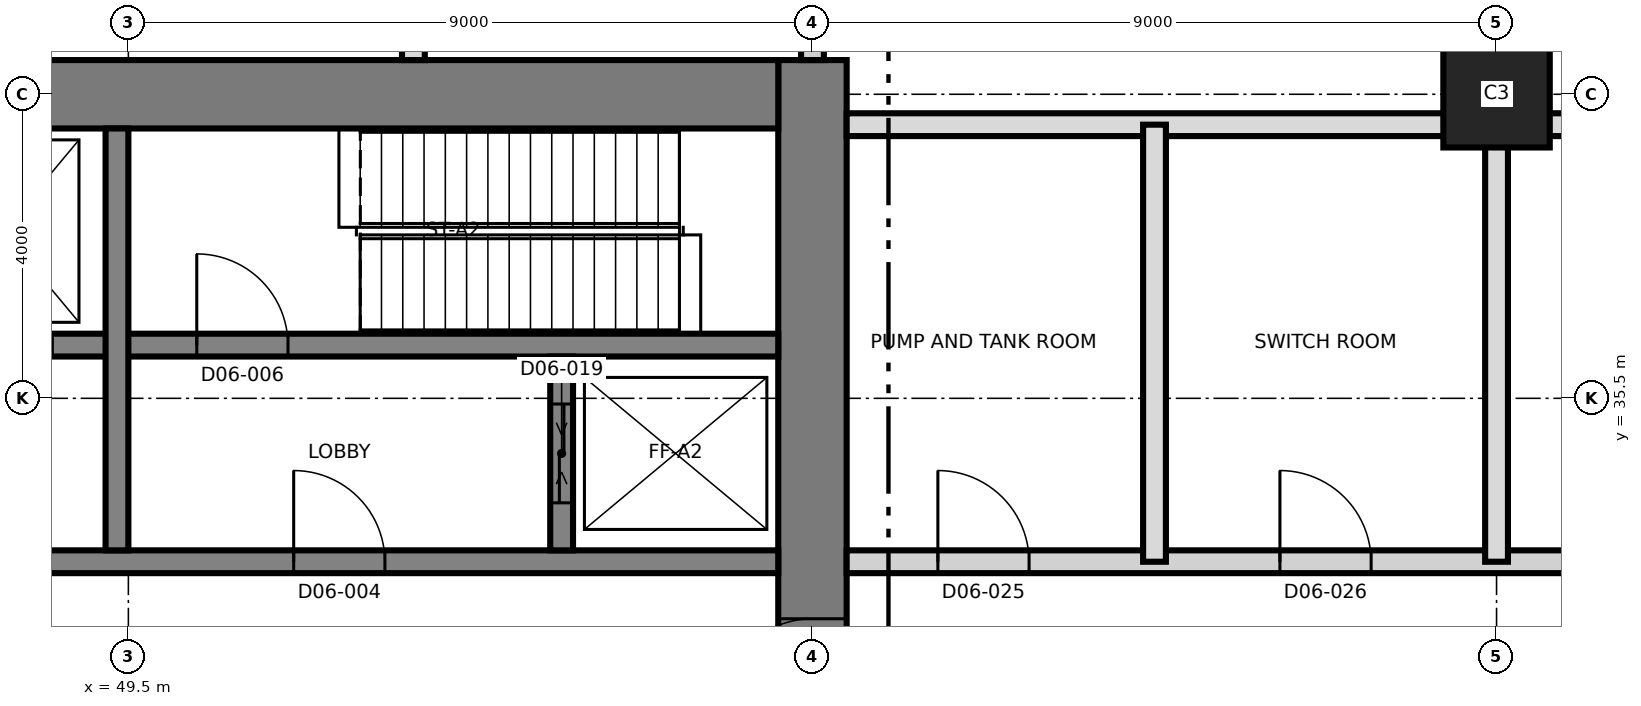
"""IFC4 building model, lengths in metres.
Left out: names, types, materials, properties, quantities, classifications, styles, units other than length and angle.
Written with IfcOpenShell. Run it as: python <this file> out.ifc"""

import sys

from ifc_helpers import new_model, si_unit, direction, frame, frame_2d, origin, origin_2d, place, context, subcontext, project, spatial, rectangle, extrude, element, fill, save


model = new_model("IFC4")
c1 = context("Model", 3, precision=1e-05, world=origin(), true_north=direction((0.0, 1.0)))
c2 = subcontext(c1, "Body", "Model", "MODEL_VIEW")
j1 = project(units=[si_unit("LENGTHUNIT", "METRE"), si_unit("PLANEANGLEUNIT", "RADIAN")], contexts=[c1])
p1 = place(None, origin())
s1 = spatial("IfcSite", under=j1, at=p1, CompositionType="ELEMENT")
p2 = place(p1, origin())
s2 = spatial("IfcBuilding", under=s1, at=p2, CompositionType="ELEMENT")
p3 = place(p2, frame((0.0, 0.0, 81.6)))
s3 = spatial("IfcBuildingStorey", under=s2, at=p3, CompositionType="ELEMENT", Elevation=81.6)
p4 = place(p3, frame((58.5, 21.05, 0.0), z_axis=(0.0, 0.0, 1.0), x_axis=(0.0, 1.0, 0.0)))
e1 = element("IfcWall", 1, at=p4, inside=s3, PredefinedType="SHEAR", context=c2, shape_type="SweptSolid", body=[
    extrude(rectangle(XDim=18.9, YDim=0.9, at=frame_2d((9.45, 0.0))), origin(), (0.0, 0.0, 1.0), 5.5),
])
p5 = place(p4, frame((10.35, 0.0, 0.0)))
e2 = element("IfcOpeningElement", 2, at=p5, cuts=e1, PredefinedType="OPENING", context=c2, shape_type="SweptSolid", body=[
    extrude(rectangle(XDim=1.2, YDim=2.1, at=frame_2d((0.6, 1.05))), frame((0.0, 0.46, 0.0), z_axis=(0.0, -1.0, 0.0), x_axis=(1.0, 0.0, 0.0)), (0.0, 0.0, 1.0), 0.92),
])
p6 = place(p3, frame((31.05, 39.5, 0.0), z_axis=(0.0, 0.0, 1.0), x_axis=(1.0, 0.0, 0.0)))
e3 = element("IfcWall", 3, at=p6, inside=s3, PredefinedType="SHEAR", context=c2, shape_type="SweptSolid", body=[
    extrude(rectangle(XDim=27.0, YDim=0.9, at=frame_2d((13.5, 0.0))), origin(), (0.0, 0.0, 1.0), 5.5),
])
p7 = place(p6, frame((10.65, 0.0, 0.0)))
e4 = element("IfcOpeningElement", 4, at=p7, cuts=e3, PredefinedType="OPENING", context=c2, shape_type="SweptSolid", body=[
    extrude(rectangle(XDim=1.2, YDim=2.1, at=frame_2d((0.6, 1.05))), frame((0.0, 0.46, 0.0), z_axis=(0.0, -1.0, 0.0), x_axis=(1.0, 0.0, 0.0)), (0.0, 0.0, 1.0), 0.92),
])
p8 = place(p3, frame((31.95, 33.35, 0.0), z_axis=(0.0, 0.0, 1.0), x_axis=(1.0, 0.0, 0.0)))
e5 = element("IfcWall", 5, at=p8, inside=s3, PredefinedType="SHEAR", context=c2, shape_type="SweptSolid", body=[
    extrude(rectangle(XDim=26.1, YDim=0.3, at=frame_2d((13.05, 0.0))), origin(), (0.0, 0.0, 1.0), 5.5),
])
p9 = place(p8, frame((13.7, 0.0, 0.0)))
e6 = element("IfcOpeningElement", 6, at=p9, cuts=e5, PredefinedType="OPENING", context=c2, shape_type="SweptSolid", body=[
    extrude(rectangle(XDim=1.4, YDim=2.1, at=frame_2d((0.7, 1.05))), frame((0.0, 0.16, 0.0), z_axis=(0.0, -1.0, 0.0), x_axis=(1.0, 0.0, 0.0)), (0.0, 0.0, 1.0), 0.32),
])
p10 = place(p8, frame((5.175, 0.0, 0.0)))
e7 = element("IfcOpeningElement", 7, at=p10, cuts=e5, PredefinedType="OPENING", context=c2, shape_type="SweptSolid", body=[
    extrude(rectangle(XDim=1.2, YDim=2.1, at=frame_2d((0.6, 1.05))), frame((0.0, 0.16, 0.0), z_axis=(0.0, -1.0, 0.0), x_axis=(1.0, 0.0, 0.0)), (0.0, 0.0, 1.0), 0.32),
])
p11 = place(p8, frame((19.725, 0.0, 0.0)))
e8 = element("IfcOpeningElement", 8, at=p11, cuts=e5, PredefinedType="OPENING", context=c2, shape_type="SweptSolid", body=[
    extrude(rectangle(XDim=1.2, YDim=2.1, at=frame_2d((0.6, 1.05))), frame((0.0, 0.16, 0.0), z_axis=(0.0, -1.0, 0.0), x_axis=(1.0, 0.0, 0.0)), (0.0, 0.0, 1.0), 0.32),
])
p12 = place(p3, frame((43.5, 36.2, 0.0), z_axis=(0.0, 0.0, 1.0), x_axis=(1.0, 0.0, 0.0)))
e9 = element("IfcWall", 9, at=p12, inside=s3, PredefinedType="SHEAR", context=c2, shape_type="SweptSolid", body=[
    extrude(rectangle(XDim=14.55, YDim=0.3, at=frame_2d((7.275, 0.0))), origin(), (0.0, 0.0, 1.0), 5.5),
])
p13 = place(p12, frame((6.9, 0.0, 0.0)))
e10 = element("IfcOpeningElement", 10, at=p13, cuts=e9, PredefinedType="OPENING", context=c2, shape_type="SweptSolid", body=[
    extrude(rectangle(XDim=1.2, YDim=2.1, at=frame_2d((0.6, 1.05))), frame((0.0, 0.16, 0.0), z_axis=(0.0, -1.0, 0.0), x_axis=(1.0, 0.0, 0.0)), (0.0, 0.0, 1.0), 0.32),
])
p14 = place(p12, frame((0.7, 0.0, 0.0)))
e11 = element("IfcOpeningElement", 11, at=p14, cuts=e9, PredefinedType="OPENING", context=c2, shape_type="SweptSolid", body=[
    extrude(rectangle(XDim=1.3, YDim=2.4, at=frame_2d((0.65, 1.2))), frame((0.0, 0.16, 0.0), z_axis=(0.0, -1.0, 0.0), x_axis=(1.0, 0.0, 0.0)), (0.0, 0.0, 1.0), 0.32),
])
p15 = place(p12, frame((3.7, 0.0, 0.0)))
e12 = element("IfcOpeningElement", 12, at=p15, cuts=e9, PredefinedType="OPENING", context=c2, shape_type="SweptSolid", body=[
    extrude(rectangle(XDim=1.3, YDim=2.4, at=frame_2d((0.65, 1.2))), frame((0.0, 0.16, 0.0), z_axis=(0.0, -1.0, 0.0), x_axis=(1.0, 0.0, 0.0)), (0.0, 0.0, 1.0), 0.32),
])
p16 = place(p3, frame((49.35, 33.5, 0.0), z_axis=(0.0, 0.0, 1.0), x_axis=(0.0, 1.0, 0.0)))
e13 = element("IfcWall", 13, at=p16, inside=s3, PredefinedType="SHEAR", context=c2, shape_type="SweptSolid", body=[
    extrude(rectangle(XDim=5.55, YDim=0.3, at=frame_2d((2.775, 0.0))), origin(), (0.0, 0.0, 1.0), 5.5),
])
p17 = place(p3, frame((55.2, 33.5, 0.0), z_axis=(0.0, 0.0, 1.0), x_axis=(0.0, 1.0, 0.0)))
e14 = element("IfcWall", 14, at=p17, inside=s3, PredefinedType="SHEAR", context=c2, shape_type="SweptSolid", body=[
    extrude(rectangle(XDim=2.55, YDim=0.3, at=frame_2d((1.275, 0.0))), origin(), (0.0, 0.0, 1.0), 5.5),
])
p18 = place(p17, frame((0.625, 0.0, 0.0)))
e15 = element("IfcOpeningElement", 15, at=p18, cuts=e14, PredefinedType="OPENING", context=c2, shape_type="SweptSolid", body=[
    extrude(rectangle(XDim=1.3, YDim=2.4, at=frame_2d((0.65, 1.2))), frame((0.0, 0.16, 0.0), z_axis=(0.0, -1.0, 0.0), x_axis=(1.0, 0.0, 0.0)), (0.0, 0.0, 1.0), 0.32),
])
p19 = place(p3, frame((67.5, 39.5, 0.0), z_axis=(0.0, 0.0, 1.0), x_axis=(1.0, 0.0, 0.0)))
e16 = element("IfcColumn", 16, at=p19, inside=s3, PredefinedType="COLUMN", context=c2, shape_type="SweptSolid", body=[
    extrude(rectangle(XDim=1.4, YDim=1.4, at=origin_2d()), origin(), (0.0, 0.0, 1.0), 5.5),
])
p20 = place(p3, frame((58.95, 33.35, 0.0), z_axis=(0.0, 0.0, 1.0), x_axis=(1.0, 0.0, 0.0)))
e17 = element("IfcWall", 17, at=p20, inside=s3, PredefinedType="PARTITIONING", context=c2, shape_type="SweptSolid", body=[
    extrude(rectangle(XDim=26.38, YDim=0.3, at=frame_2d((13.19, 0.0))), origin(), (0.0, 0.0, 1.0), 5.2),
])
p21 = place(p20, frame((1.2, 0.0, 0.0)))
e18 = element("IfcOpeningElement", 18, at=p21, cuts=e17, PredefinedType="OPENING", context=c2, shape_type="SweptSolid", body=[
    extrude(rectangle(XDim=1.2, YDim=2.1, at=frame_2d((0.6, 1.05))), frame((0.0, 0.16, 0.0), z_axis=(0.0, -1.0, 0.0), x_axis=(1.0, 0.0, 0.0)), (0.0, 0.0, 1.0), 0.32),
])
p22 = place(p20, frame((5.7, 0.0, 0.0)))
e19 = element("IfcOpeningElement", 19, at=p22, cuts=e17, PredefinedType="OPENING", context=c2, shape_type="SweptSolid", body=[
    extrude(rectangle(XDim=1.2, YDim=2.1, at=frame_2d((0.6, 1.05))), frame((0.0, 0.16, 0.0), z_axis=(0.0, -1.0, 0.0), x_axis=(1.0, 0.0, 0.0)), (0.0, 0.0, 1.0), 0.32),
])
p23 = place(p20, frame((10.2, 0.0, 0.0)))
e20 = element("IfcOpeningElement", 20, at=p23, cuts=e17, PredefinedType="OPENING", context=c2, shape_type="SweptSolid", body=[
    extrude(rectangle(XDim=1.2, YDim=2.1, at=frame_2d((0.6, 1.05))), frame((0.0, 0.16, 0.0), z_axis=(0.0, -1.0, 0.0), x_axis=(1.0, 0.0, 0.0)), (0.0, 0.0, 1.0), 0.32),
])
p24 = place(p20, frame((14.7, 0.0, 0.0)))
e21 = element("IfcOpeningElement", 21, at=p24, cuts=e17, PredefinedType="OPENING", context=c2, shape_type="SweptSolid", body=[
    extrude(rectangle(XDim=1.2, YDim=2.1, at=frame_2d((0.6, 1.05))), frame((0.0, 0.16, 0.0), z_axis=(0.0, -1.0, 0.0), x_axis=(1.0, 0.0, 0.0)), (0.0, 0.0, 1.0), 0.32),
])
p25 = place(p20, frame((19.2, 0.0, 0.0)))
e22 = element("IfcOpeningElement", 22, at=p25, cuts=e17, PredefinedType="OPENING", context=c2, shape_type="SweptSolid", body=[
    extrude(rectangle(XDim=1.2, YDim=2.1, at=frame_2d((0.6, 1.05))), frame((0.0, 0.16, 0.0), z_axis=(0.0, -1.0, 0.0), x_axis=(1.0, 0.0, 0.0)), (0.0, 0.0, 1.0), 0.32),
])
p26 = place(p20, frame((23.7, 0.0, 0.0)))
e23 = element("IfcOpeningElement", 23, at=p26, cuts=e17, PredefinedType="OPENING", context=c2, shape_type="SweptSolid", body=[
    extrude(rectangle(XDim=1.2, YDim=2.1, at=frame_2d((0.6, 1.05))), frame((0.0, 0.16, 0.0), z_axis=(0.0, -1.0, 0.0), x_axis=(1.0, 0.0, 0.0)), (0.0, 0.0, 1.0), 0.32),
])
p27 = place(p3, frame((58.95, 39.1, 0.0), z_axis=(0.0, 0.0, 1.0), x_axis=(1.0, 0.0, 0.0)))
e24 = element("IfcWall", 24, at=p27, inside=s3, PredefinedType="PARTITIONING", context=c2, shape_type="SweptSolid", body=[
    extrude(rectangle(XDim=26.38, YDim=0.3, at=frame_2d((13.19, 0.0))), origin(), (0.0, 0.0, 1.0), 5.2),
])
p28 = place(p3, frame((53.25, 39.95, 0.0), z_axis=(0.0, 0.0, 1.0), x_axis=(0.0, 1.0, 0.0)))
e25 = element("IfcWall", 25, at=p28, inside=s3, PredefinedType="PARTITIONING", context=c2, shape_type="SweptSolid", body=[
    extrude(rectangle(XDim=1.324, YDim=0.3, at=frame_2d((0.662, 0.0))), origin(), (0.0, 0.0, 1.0), 5.15),
])
for number, where, z_axis, x_axis in (
    (26, (63.0, 33.35, 0.0), (0.0, 0.0, 1.0), (0.0, 1.0, 0.0)),
    (27, (67.5, 33.35, 0.0), (0.0, 0.0, 1.0), (0.0, 1.0, 0.0)),
):
    element("IfcWall", number, at=place(p3, frame(where, z_axis=z_axis, x_axis=x_axis)), inside=s3, PredefinedType="PARTITIONING", context=c2, shape_type="SweptSolid", body=[
        extrude(rectangle(XDim=5.75, YDim=0.3, at=frame_2d((2.875, 0.0))), origin(), (0.0, 0.0, 1.0), 5.2),
    ])
p29 = place(p3, frame((58.5, 39.95, 0.0), z_axis=(0.0, 0.0, 1.0), x_axis=(0.0, 1.0, 0.0)))
e28 = element("IfcWall", 28, at=p29, inside=s3, PredefinedType="PARTITIONING", context=c2, shape_type="SweptSolid", body=[
    extrude(rectangle(XDim=0.74, YDim=0.3, at=frame_2d((0.37, 0.0))), origin(), (0.0, 0.0, 1.0), 5.2),
])
p30 = place(p11, origin())
e29 = element("IfcDoor", 29, at=p30, inside=s3, OperationType="SINGLE_SWING_RIGHT", PredefinedType="DOOR", context=c2, shape_type="SweptSolid", body=[
    extrude(rectangle(XDim=1.2, YDim=2.1, at=frame_2d((0.6, 1.05))), frame((0.0, 0.025, 0.0), z_axis=(0.0, -1.0, 0.0), x_axis=(1.0, 0.0, 0.0)), (0.0, 0.0, 1.0), 0.05),
])
fill(e8, e29)
p31 = place(p13, origin())
e30 = element("IfcDoor", 30, at=p31, inside=s3, OperationType="SINGLE_SWING_LEFT", PredefinedType="DOOR", context=c2, shape_type="SweptSolid", body=[
    extrude(rectangle(XDim=1.2, YDim=2.1, at=frame_2d((0.6, 1.05))), frame((0.0, 0.025, 0.0), z_axis=(0.0, -1.0, 0.0), x_axis=(1.0, 0.0, 0.0)), (0.0, 0.0, 1.0), 0.05),
])
fill(e10, e30)
p32 = place(p5, origin())
e31 = element("IfcDoor", 31, at=p32, inside=s3, OperationType="SINGLE_SWING_LEFT", PredefinedType="DOOR", context=c2, shape_type="SweptSolid", body=[
    extrude(rectangle(XDim=1.2, YDim=2.1, at=frame_2d((0.6, 1.05))), frame((0.0, 0.025, 0.0), z_axis=(0.0, -1.0, 0.0), x_axis=(1.0, 0.0, 0.0)), (0.0, 0.0, 1.0), 0.05),
])
fill(e2, e31)
p33 = place(p18, origin())
e32 = element("IfcDoor", 32, at=p33, inside=s3, OperationType="SLIDING_TO_LEFT", PredefinedType="DOOR", context=c2, shape_type="SweptSolid", body=[
    extrude(rectangle(XDim=1.3, YDim=2.4, at=frame_2d((0.65, 1.2))), frame((0.0, 0.025, 0.0), z_axis=(0.0, -1.0, 0.0), x_axis=(1.0, 0.0, 0.0)), (0.0, 0.0, 1.0), 0.05),
])
fill(e15, e32)
p34 = place(p21, origin())
e33 = element("IfcDoor", 33, at=p34, inside=s3, OperationType="SINGLE_SWING_LEFT", PredefinedType="DOOR", context=c2, shape_type="SweptSolid", body=[
    extrude(rectangle(XDim=1.2, YDim=2.1, at=frame_2d((0.6, 1.05))), frame((0.0, 0.025, 0.0), z_axis=(0.0, -1.0, 0.0), x_axis=(1.0, 0.0, 0.0)), (0.0, 0.0, 1.0), 0.05),
])
fill(e18, e33)
p35 = place(p22, origin())
e34 = element("IfcDoor", 34, at=p35, inside=s3, OperationType="SINGLE_SWING_LEFT", PredefinedType="DOOR", context=c2, shape_type="SweptSolid", body=[
    extrude(rectangle(XDim=1.2, YDim=2.1, at=frame_2d((0.6, 1.05))), frame((0.0, 0.025, 0.0), z_axis=(0.0, -1.0, 0.0), x_axis=(1.0, 0.0, 0.0)), (0.0, 0.0, 1.0), 0.05),
])
fill(e19, e34)
save(model, sys.argv[1])
